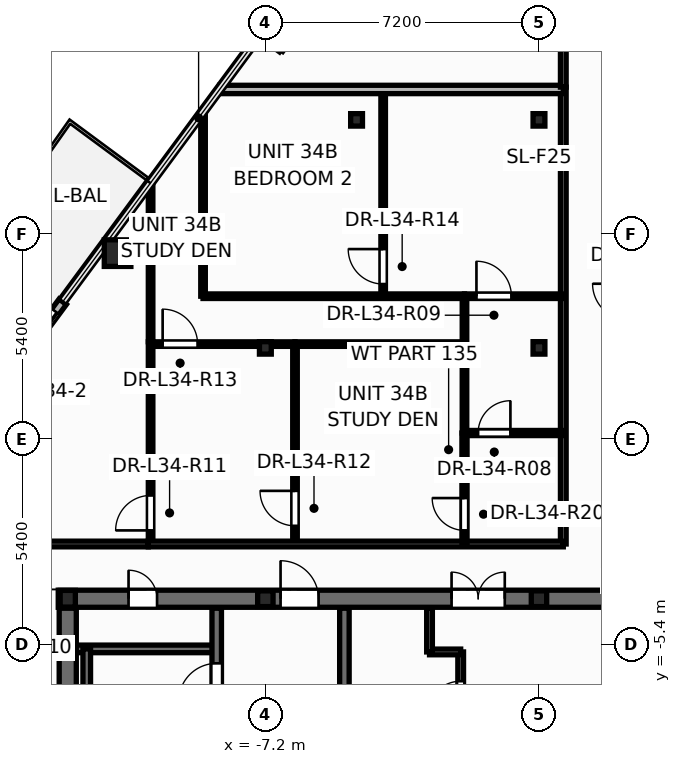
"""IFC4 building model, lengths in metres.
Left out: names, types, materials, properties, quantities, classifications, styles, units other than length and angle.
Written with IfcOpenShell. Run it as: python <this file> out.ifc"""

import sys

from ifc_helpers import new_model, si_unit, direction, frame, frame_2d, origin, origin_2d, place, context, subcontext, project, spatial, rectangle, hollow_circle, i_section, extrude, element, fill, save


model = new_model("IFC4")
c1 = context("Model", 3, precision=1e-05, world=origin(), true_north=direction((0.0, 1.0)))
c2 = subcontext(c1, "Body", "Model", "MODEL_VIEW")
j1 = project(units=[si_unit("LENGTHUNIT", "METRE"), si_unit("PLANEANGLEUNIT", "RADIAN")], contexts=[c1])
p1 = place(None, origin())
s1 = spatial("IfcSite", under=j1, at=p1, CompositionType="ELEMENT")
p2 = place(p1, origin())
s2 = spatial("IfcBuilding", under=s1, at=p2, CompositionType="ELEMENT")
p3 = place(p2, frame((0.0, 0.0, 132.9)))
s3 = spatial("IfcBuildingStorey", under=s2, at=p3, CompositionType="ELEMENT", Elevation=132.9)
p4 = place(p3, frame((-11.089, 4.894, 0.0), z_axis=(0.0, 0.0, 1.0), x_axis=(1.0, 0.0, 0.0)))
e1 = element("IfcColumn", 1, at=p4, inside=s3, PredefinedType="COLUMN", context=c2, shape_type="SweptSolid", body=[
    extrude(hollow_circle(Radius=0.35, WallThickness=0.03, at=origin_2d()), origin(), (0.0, 0.0, 1.0), 3.6),
])
p5 = place(p3, frame((-12.4, -4.2, 0.0), z_axis=(0.0, 0.0, 1.0), x_axis=(1.0, 0.0, 0.0)))
e2 = element("IfcColumn", 2, at=p5, inside=s3, PredefinedType="COLUMN", context=c2, shape_type="SweptSolid", body=[
    extrude(i_section(OverallWidth=0.4, OverallDepth=0.44, WebThickness=0.028, FlangeThickness=0.04, at=origin_2d()), origin(), (0.0, 0.0, 1.0), 3.6),
])
for number, where, z_axis, x_axis in (
    (3, (-7.2, -4.2, 0.0), (0.0, 0.0, 1.0), (1.0, 0.0, 0.0)),
    (4, (0.0, -4.2, 0.0), (0.0, 0.0, 1.0), (1.0, 0.0, 0.0)),
):
    element("IfcColumn", number, at=place(p3, frame(where, z_axis=z_axis, x_axis=x_axis)), inside=s3, PredefinedType="PILASTER", context=c2, shape_type="SweptSolid", body=[
        extrude(i_section(OverallWidth=0.405, OverallDepth=0.414, WebThickness=0.022, FlangeThickness=0.032, at=origin_2d()), origin(), (0.0, 0.0, 1.0), 3.6),
    ])
for number, where, z_axis, x_axis in (
    (5, (-7.2, 2.4, 0.0), (0.0, 0.0, 1.0), (1.0, 0.0, 0.0)),
    (6, (0.0, 2.4, 0.0), (0.0, 0.0, 1.0), (1.0, 0.0, 0.0)),
    (7, (-4.8, 8.4, 0.0), (0.0, 0.0, 1.0), (1.0, 0.0, 0.0)),
    (8, (0.0, 8.4, 0.0), (0.0, 0.0, 1.0), (1.0, 0.0, 0.0)),
):
    element("IfcColumn", number, at=place(p3, frame(where, z_axis=z_axis, x_axis=x_axis)), inside=s3, PredefinedType="COLUMN", context=c2, shape_type="SweptSolid", body=[
        extrude(i_section(OverallWidth=0.311, OverallDepth=0.327, WebThickness=0.016, FlangeThickness=0.025, at=origin_2d()), origin(), (0.0, 0.0, 1.0), 3.6),
    ])
p6 = place(p3, frame((-12.532, 3.614, -0.015), z_axis=(0.0, 0.0, 1.0), x_axis=(-0.594381437757, -0.804183254271, 0.0)))
e9 = element("IfcWall", 9, at=p6, inside=s3, PredefinedType="STANDARD", context=c2, shape_type="SweptSolid", body=[
    extrude(rectangle(XDim=2.14, YDim=0.24, at=frame_2d((1.07, 0.0))), origin(), (0.0, 0.0, 1.0), 2.807),
])
p7 = place(p6, frame((0.32, 0.0, 0.015)))
e10 = element("IfcOpeningElement", 10, at=p7, cuts=e9, PredefinedType="OPENING", context=c2, shape_type="SweptSolid", body=[
    extrude(rectangle(XDim=1.506, YDim=2.204, at=frame_2d((0.75, 1.102))), frame((0.0, 0.13, 0.0), z_axis=(0.0, -1.0, 0.0), x_axis=(1.0, 0.0, 0.0)), (0.0, 0.0, 1.0), 0.26),
])
p8 = place(p3, frame((-2.06, -7.9, 0.0), z_axis=(0.0, 0.0, 1.0), x_axis=(0.0, 1.0, 0.0)))
e11 = element("IfcWall", 11, at=p8, inside=s3, PredefinedType="PARTITIONING", context=c2, shape_type="SweptSolid", body=[
    extrude(rectangle(XDim=2.3, YDim=0.15, at=frame_2d((1.15, 0.0))), origin(), (0.0, 0.0, 1.0), 3.35),
])
p9 = place(p8, frame((0.65, 0.0, 0.0)))
e12 = element("IfcOpeningElement", 12, at=p9, cuts=e11, PredefinedType="OPENING", context=c2, shape_type="SweptSolid", body=[
    extrude(rectangle(XDim=0.886, YDim=2.104, at=frame_2d((0.44, 1.052))), frame((0.0, 0.085, 0.0), z_axis=(0.0, -1.0, 0.0), x_axis=(1.0, 0.0, 0.0)), (0.0, 0.0, 1.0), 0.17),
])
p10 = place(p3, frame((-2.88, -5.6, 0.0), z_axis=(0.0, 0.0, 1.0), x_axis=(1.0, 0.0, 0.0)))
e13 = element("IfcWall", 13, at=p10, inside=s3, PredefinedType="PARTITIONING", context=c2, shape_type="SweptSolid", body=[
    extrude(rectangle(XDim=0.82, YDim=0.15, at=frame_2d((0.41, 0.0))), origin(), (0.0, 0.0, 1.0), 3.35),
])
p11 = place(p3, frame((-2.88, -5.6, 0.0), z_axis=(0.0, 0.0, 1.0), x_axis=(0.0, 1.0, 0.0)))
e14 = element("IfcWall", 14, at=p11, inside=s3, PredefinedType="PARTITIONING", context=c2, shape_type="SweptSolid", body=[
    extrude(rectangle(XDim=1.15, YDim=0.15, at=frame_2d((0.575, 0.0))), origin(), (0.0, 0.0, 1.0), 3.35),
])
p12 = place(p3, frame((-12.65, -4.2, 0.0), z_axis=(0.0, 0.0, 1.0), x_axis=(1.0, 0.0, 0.0)))
e15 = element("IfcWall", 15, at=p12, inside=s3, PredefinedType="SHEAR", context=c2, shape_type="SweptSolid", body=[
    extrude(rectangle(XDim=25.3, YDim=0.45, at=frame_2d((12.65, 0.0))), origin(), (0.0, 0.0, 1.0), 3.6),
])
p13 = place(p12, frame((1.85, 0.0, 0.0)))
e16 = element("IfcOpeningElement", 16, at=p13, cuts=e15, PredefinedType="OPENING", context=c2, shape_type="SweptSolid", body=[
    extrude(rectangle(XDim=0.756, YDim=2.054, at=frame_2d((0.375, 1.027))), frame((0.0, 0.235, 0.0), z_axis=(0.0, -1.0, 0.0), x_axis=(1.0, 0.0, 0.0)), (0.0, 0.0, 1.0), 0.47),
])
p14 = place(p12, frame((21.85, 0.0, 0.0)))
e17 = element("IfcOpeningElement", 17, at=p14, cuts=e15, PredefinedType="OPENING", context=c2, shape_type="SweptSolid", body=[
    extrude(rectangle(XDim=0.756, YDim=2.054, at=frame_2d((0.375, 1.027))), frame((0.0, 0.235, 0.0), z_axis=(0.0, -1.0, 0.0), x_axis=(1.0, 0.0, 0.0)), (0.0, 0.0, 1.0), 0.47),
])
p15 = place(p12, frame((23.5, 0.0, 0.0)))
e18 = element("IfcOpeningElement", 18, at=p15, cuts=e15, PredefinedType="OPENING", context=c2, shape_type="SweptSolid", body=[
    extrude(rectangle(XDim=0.756, YDim=2.054, at=frame_2d((0.375, 1.027))), frame((0.0, 0.235, 0.0), z_axis=(0.0, -1.0, 0.0), x_axis=(1.0, 0.0, 0.0)), (0.0, 0.0, 1.0), 0.47),
])
p16 = place(p12, frame((5.85, 0.0, 0.0)))
e19 = element("IfcOpeningElement", 19, at=p16, cuts=e15, PredefinedType="OPENING", context=c2, shape_type="SweptSolid", body=[
    extrude(rectangle(XDim=1.006, YDim=2.104, at=frame_2d((0.5, 1.052))), frame((0.0, 0.235, 0.0), z_axis=(0.0, -1.0, 0.0), x_axis=(1.0, 0.0, 0.0)), (0.0, 0.0, 1.0), 0.47),
])
p17 = place(p12, frame((10.35, 0.0, 0.0)))
e20 = element("IfcOpeningElement", 20, at=p17, cuts=e15, PredefinedType="OPENING", context=c2, shape_type="SweptSolid", body=[
    extrude(rectangle(XDim=1.406, YDim=2.154, at=frame_2d((0.7, 1.077))), frame((0.0, 0.235, 0.0), z_axis=(0.0, -1.0, 0.0), x_axis=(1.0, 0.0, 0.0)), (0.0, 0.0, 1.0), 0.47),
])
p18 = place(p12, frame((18.45, 0.0, 0.0)))
e21 = element("IfcOpeningElement", 21, at=p18, cuts=e15, PredefinedType="OPENING", context=c2, shape_type="SweptSolid", body=[
    extrude(rectangle(XDim=1.006, YDim=2.104, at=frame_2d((0.5, 1.052))), frame((0.0, 0.235, 0.0), z_axis=(0.0, -1.0, 0.0), x_axis=(1.0, 0.0, 0.0)), (0.0, 0.0, 1.0), 0.47),
])
p19 = place(p3, frame((-12.35, -5.52, 0.0), z_axis=(0.0, 0.0, 1.0), x_axis=(1.0, 0.0, 0.0)))
e22 = element("IfcWall", 22, at=p19, inside=s3, PredefinedType="SOLIDWALL", context=c2, shape_type="SweptSolid", body=[
    extrude(rectangle(XDim=3.87, YDim=0.2, at=frame_2d((1.935, 0.0))), origin(), (0.0, 0.0, 1.0), 3.6),
])
p20 = place(p3, frame((-11.9, -13.1, 0.0), z_axis=(0.0, 0.0, 1.0), x_axis=(0.0, 1.0, 0.0)))
e23 = element("IfcWall", 23, at=p20, inside=s3, PredefinedType="SOLIDWALL", context=c2, shape_type="SweptSolid", body=[
    extrude(rectangle(XDim=7.58, YDim=0.2, at=frame_2d((3.79, 0.0))), origin(), (0.0, 0.0, 1.0), 3.6),
])
p21 = place(p3, frame((-8.48, -13.85, 0.0), z_axis=(0.0, 0.0, 1.0), x_axis=(0.0, 1.0, 0.0)))
e24 = element("IfcWall", 24, at=p21, inside=s3, PredefinedType="SHEAR", context=c2, shape_type="SweptSolid", body=[
    extrude(rectangle(XDim=9.4, YDim=0.25, at=frame_2d((4.7, 0.0))), origin(), (0.0, 0.0, 1.0), 3.6),
])
p22 = place(p21, frame((6.95, 0.0, 0.0)))
e25 = element("IfcOpeningElement", 25, at=p22, cuts=e24, PredefinedType="OPENING", context=c2, shape_type="SweptSolid", body=[
    extrude(rectangle(XDim=1.006, YDim=2.104, at=frame_2d((0.5, 1.052))), frame((0.0, 0.135, 0.0), z_axis=(0.0, -1.0, 0.0), x_axis=(1.0, 0.0, 0.0)), (0.0, 0.0, 1.0), 0.27),
])
p23 = place(p3, frame((-5.12, -13.85, 0.0), z_axis=(0.0, 0.0, 1.0), x_axis=(0.0, 1.0, 0.0)))
e26 = element("IfcWall", 26, at=p23, inside=s3, PredefinedType="SHEAR", context=c2, shape_type="SweptSolid", body=[
    extrude(rectangle(XDim=9.4, YDim=0.25, at=frame_2d((4.7, 0.0))), origin(), (0.0, 0.0, 1.0), 3.6),
])
p24 = place(p3, frame((-12.4, -13.85, 0.0), z_axis=(0.0, 0.0, 1.0), x_axis=(0.0, 1.0, 0.0)))
e27 = element("IfcWall", 27, at=p24, inside=s3, PredefinedType="SHEAR", context=c2, shape_type="SweptSolid", body=[
    extrude(rectangle(XDim=9.4, YDim=0.45, at=frame_2d((4.7, 0.0))), origin(), (0.0, 0.0, 1.0), 3.6),
])
p25 = place(p3, frame((0.64, -2.76, 0.0), z_axis=(0.0, 0.0, 1.0), x_axis=(0.0, 1.0, 0.0)))
e28 = element("IfcWall", 28, at=p25, inside=s3, PredefinedType="PARTITIONING", context=c2, shape_type="SweptSolid", body=[
    extrude(rectangle(XDim=12.02, YDim=0.15, at=frame_2d((6.01, 0.0))), origin(), (0.0, 0.0, 1.0), 2.325),
])
p26 = place(p3, frame((-4.1, 3.76, 0.0), z_axis=(0.0, 0.0, 1.0), x_axis=(0.0, 1.0, 0.0)))
e29 = element("IfcWall", 29, at=p26, inside=s3, PredefinedType="PARTITIONING", context=c2, shape_type="SweptSolid", body=[
    extrude(rectangle(XDim=5.44, YDim=0.12, at=frame_2d((2.72, 0.0))), origin(), (0.0, 0.0, 1.0), 2.617),
])
p27 = place(p26, frame((0.32, 0.0, 0.0)))
e30 = element("IfcOpeningElement", 30, at=p27, cuts=e29, PredefinedType="OPENING", context=c2, shape_type="SweptSolid", body=[
    extrude(rectangle(XDim=0.926, YDim=2.104, at=frame_2d((0.46, 1.052))), frame((0.0, 0.07, 0.0), z_axis=(0.0, -1.0, 0.0), x_axis=(1.0, 0.0, 0.0)), (0.0, 0.0, 1.0), 0.14),
])
p28 = place(p3, frame((-10.22, -2.76, 0.0), z_axis=(0.0, 0.0, 1.0), x_axis=(0.0, 1.0, 0.0)))
e31 = element("IfcWall", 31, at=p28, inside=s3, PredefinedType="PARTITIONING", context=c2, shape_type="SweptSolid", body=[
    extrude(rectangle(XDim=5.32, YDim=0.12, at=frame_2d((2.66, 0.0))), origin(), (0.0, 0.0, 1.0), 2.617),
])
p29 = place(p28, frame((0.358, 0.0, 0.0)))
e32 = element("IfcOpeningElement", 32, at=p29, cuts=e31, PredefinedType="OPENING", context=c2, shape_type="SweptSolid", body=[
    extrude(rectangle(XDim=0.926, YDim=2.104, at=frame_2d((0.46, 1.052))), frame((0.0, 0.07, 0.0), z_axis=(0.0, -1.0, 0.0), x_axis=(1.0, 0.0, 0.0)), (0.0, 0.0, 1.0), 0.14),
])
p30 = place(p3, frame((-6.42, -2.76, 0.0), z_axis=(0.0, 0.0, 1.0), x_axis=(0.0, 1.0, 0.0)))
e33 = element("IfcWall", 33, at=p30, inside=s3, PredefinedType="PARTITIONING", context=c2, shape_type="SweptSolid", body=[
    extrude(rectangle(XDim=5.26, YDim=0.12, at=frame_2d((2.63, 0.0))), origin(), (0.0, 0.0, 1.0), 2.325),
])
p31 = place(p30, frame((0.478, 0.0, 0.0)))
e34 = element("IfcOpeningElement", 34, at=p31, cuts=e33, PredefinedType="OPENING", context=c2, shape_type="SweptSolid", body=[
    extrude(rectangle(XDim=0.926, YDim=2.104, at=frame_2d((0.46, 1.052))), frame((0.0, 0.07, 0.0), z_axis=(0.0, -1.0, 0.0), x_axis=(1.0, 0.0, 0.0)), (0.0, 0.0, 1.0), 0.14),
])
p32 = place(p3, frame((-8.84, 3.76, 0.0), z_axis=(0.0, 0.0, 1.0), x_axis=(0.0, 1.0, 0.0)))
e35 = element("IfcWall", 35, at=p32, inside=s3, PredefinedType="PARTITIONING", context=c2, shape_type="SweptSolid", body=[
    extrude(rectangle(XDim=4.849, YDim=0.12, at=frame_2d((2.425, 0.0))), origin(), (0.0, 0.0, 1.0), 2.617),
])
p33 = place(p3, frame((-8.84, 3.76, 0.0), z_axis=(0.0, 0.0, 1.0), x_axis=(1.0, 0.0, 0.0)))
e36 = element("IfcWall", 36, at=p33, inside=s3, PredefinedType="PARTITIONING", context=c2, shape_type="SweptSolid", body=[
    extrude(rectangle(XDim=6.88, YDim=0.12, at=frame_2d((3.44, 0.0))), origin(), (0.0, 0.0, 1.0), 2.617),
])
p34 = place(p3, frame((-8.404, 9.2, 0.0), z_axis=(0.0, 0.0, 1.0), x_axis=(1.0, 0.0, 0.0)))
e37 = element("IfcWall", 37, at=p34, inside=s3, PredefinedType="PARTITIONING", context=c2, shape_type="SweptSolid", body=[
    extrude(rectangle(XDim=9.043, YDim=0.22, at=frame_2d((4.522, 0.0))), origin(), (0.0, 0.0, 1.0), 2.617),
])
p35 = place(p3, frame((-10.28, -2.76, 0.0), z_axis=(0.0, 0.0, 1.0), x_axis=(1.0, 0.0, 0.0)))
e38 = element("IfcWall", 38, at=p35, inside=s3, PredefinedType="PARTITIONING", context=c2, shape_type="SweptSolid", body=[
    extrude(rectangle(XDim=10.92, YDim=0.15, at=frame_2d((5.46, 0.0))), origin(), (0.0, 0.0, 1.0), 2.325),
])
p36 = place(p3, frame((-14.64, -2.76, 0.0), z_axis=(0.0, 0.0, 1.0), x_axis=(1.0, 0.0, 0.0)))
e39 = element("IfcWall", 39, at=p36, inside=s3, PredefinedType="PARTITIONING", context=c2, shape_type="SweptSolid", body=[
    extrude(rectangle(XDim=4.358, YDim=0.15, at=frame_2d((2.179, 0.0))), origin(), (0.0, 0.0, 1.0), 3.35),
])
p37 = place(p36, frame((0.358, 0.0, 0.0)))
e40 = element("IfcOpeningElement", 40, at=p37, cuts=e39, PredefinedType="OPENING", context=c2, shape_type="SweptSolid", body=[
    extrude(rectangle(XDim=0.956, YDim=2.104, at=frame_2d((0.475, 1.052))), frame((0.0, 0.085, 0.0), z_axis=(0.0, -1.0, 0.0), x_axis=(1.0, 0.0, 0.0)), (0.0, 0.0, 1.0), 0.17),
])
p38 = place(p3, frame((-6.42, 2.5, 0.0), z_axis=(0.0, 0.0, 1.0), x_axis=(1.0, 0.0, 0.0)))
e41 = element("IfcWall", 41, at=p38, inside=s3, PredefinedType="PARTITIONING", context=c2, shape_type="SweptSolid", body=[
    extrude(rectangle(XDim=4.46, YDim=0.12, at=frame_2d((2.23, 0.0))), origin(), (0.0, 0.0, 1.0), 2.325),
])
p39 = place(p3, frame((-10.22, 2.562, 0.0), z_axis=(0.0, 0.0, 1.0), x_axis=(0.0, 1.0, 0.0)))
e42 = element("IfcWall", 42, at=p39, inside=s3, PredefinedType="PARTITIONING", context=c2, shape_type="SweptSolid", body=[
    extrude(rectangle(XDim=4.18, YDim=0.12, at=frame_2d((2.09, 0.0))), origin(), (0.0, 0.0, 1.0), 2.617),
])
p40 = place(p3, frame((0.64, 9.262, 0.0), z_axis=(0.0, 0.0, 1.0), x_axis=(0.0, 1.0, 0.0)))
e43 = element("IfcWall", 43, at=p40, inside=s3, PredefinedType="PARTITIONING", context=c2, shape_type="SweptSolid", body=[
    extrude(rectangle(XDim=4.052, YDim=0.15, at=frame_2d((2.026, 0.0))), origin(), (0.0, 0.0, 1.0), 2.792),
])
p41 = place(p40, frame((1.031, 0.0, 0.0)))
e44 = element("IfcOpeningElement", 44, at=p41, cuts=e43, PredefinedType="OPENING", context=c2, shape_type="SweptSolid", body=[
    extrude(rectangle(XDim=0.956, YDim=2.104, at=frame_2d((0.475, 1.052))), frame((0.0, 0.085, 0.0), z_axis=(0.0, -1.0, 0.0), x_axis=(1.0, 0.0, 0.0)), (0.0, 0.0, 1.0), 0.17),
])
p42 = place(p3, frame((-10.22, 2.5, 0.0), z_axis=(0.0, 0.0, 1.0), x_axis=(1.0, 0.0, 0.0)))
e45 = element("IfcWall", 45, at=p42, inside=s3, PredefinedType="PARTITIONING", context=c2, shape_type="SweptSolid", body=[
    extrude(rectangle(XDim=3.8, YDim=0.12, at=frame_2d((1.9, 0.0))), origin(), (0.0, 0.0, 1.0), 2.325),
])
p43 = place(p42, frame((0.317, 0.0, 0.0)))
e46 = element("IfcOpeningElement", 46, at=p43, cuts=e45, PredefinedType="OPENING", context=c2, shape_type="SweptSolid", body=[
    extrude(rectangle(XDim=0.926, YDim=2.104, at=frame_2d((0.46, 1.052))), frame((0.0, 0.07, 0.0), z_axis=(0.0, -1.0, 0.0), x_axis=(1.0, 0.0, 0.0)), (0.0, 0.0, 1.0), 0.14),
])
p44 = place(p3, frame((-1.96, -2.76, 0.0), z_axis=(0.0, 0.0, 1.0), x_axis=(0.0, 1.0, 0.0)))
e47 = element("IfcWall", 47, at=p44, inside=s3, PredefinedType="PARTITIONING", context=c2, shape_type="SweptSolid", body=[
    extrude(rectangle(XDim=2.92, YDim=0.135, at=frame_2d((1.46, 0.0))), origin(), (0.0, 0.0, 1.0), 3.35),
])
p45 = place(p44, frame((0.359, 0.0, 0.0)))
e48 = element("IfcOpeningElement", 48, at=p45, cuts=e47, PredefinedType="OPENING", context=c2, shape_type="SweptSolid", body=[
    extrude(rectangle(XDim=0.856, YDim=2.104, at=frame_2d((0.425, 1.052))), frame((0.0, 0.078, 0.0), z_axis=(0.0, -1.0, 0.0), x_axis=(1.0, 0.0, 0.0)), (0.0, 0.0, 1.0), 0.155),
])
p46 = place(p3, frame((-1.96, 0.16, 0.0), z_axis=(0.0, 0.0, 1.0), x_axis=(1.0, 0.0, 0.0)))
e49 = element("IfcWall", 49, at=p46, inside=s3, PredefinedType="PARTITIONING", context=c2, shape_type="SweptSolid", body=[
    extrude(rectangle(XDim=2.6, YDim=0.135, at=frame_2d((1.3, 0.0))), origin(), (0.0, 0.0, 1.0), 2.325),
])
p47 = place(p46, frame((0.358, 0.0, 0.0)))
e50 = element("IfcOpeningElement", 50, at=p47, cuts=e49, PredefinedType="OPENING", context=c2, shape_type="SweptSolid", body=[
    extrude(rectangle(XDim=0.856, YDim=2.104, at=frame_2d((0.425, 1.052))), frame((0.0, 0.078, 0.0), z_axis=(0.0, -1.0, 0.0), x_axis=(1.0, 0.0, 0.0)), (0.0, 0.0, 1.0), 0.155),
])
p48 = place(p3, frame((-1.96, 3.76, 0.0), z_axis=(0.0, 0.0, 1.0), x_axis=(1.0, 0.0, 0.0)))
e51 = element("IfcWall", 51, at=p48, inside=s3, PredefinedType="PARTITIONING", context=c2, shape_type="SweptSolid", body=[
    extrude(rectangle(XDim=2.6, YDim=0.12, at=frame_2d((1.3, 0.0))), origin(), (0.0, 0.0, 1.0), 2.325),
])
p49 = place(p48, frame((0.315, 0.0, 0.0)))
e52 = element("IfcOpeningElement", 52, at=p49, cuts=e51, PredefinedType="OPENING", context=c2, shape_type="SweptSolid", body=[
    extrude(rectangle(XDim=0.926, YDim=2.104, at=frame_2d((0.46, 1.052))), frame((0.0, 0.07, 0.0), z_axis=(0.0, -1.0, 0.0), x_axis=(1.0, 0.0, 0.0)), (0.0, 0.0, 1.0), 0.14),
])
p50 = place(p3, frame((-1.96, 0.16, 0.0), z_axis=(0.0, 0.0, 1.0), x_axis=(0.0, 1.0, 0.0)))
e53 = element("IfcWall", 53, at=p50, inside=s3, PredefinedType="PARTITIONING", context=c2, shape_type="SweptSolid", body=[
    extrude(rectangle(XDim=3.6, YDim=0.12, at=frame_2d((1.8, 0.0))), origin(), (0.0, 0.0, 1.0), 2.325),
])
p51 = place(p7, origin())
e54 = element("IfcDoor", 54, at=p51, inside=s3, OperationType="SLIDING_TO_RIGHT", PredefinedType="DOOR", context=c2, shape_type="SweptSolid", body=[
    extrude(rectangle(XDim=1.5, YDim=2.2, at=frame_2d((0.75, 1.1))), frame((0.0, 0.025, 0.0), z_axis=(0.0, -1.0, 0.0), x_axis=(1.0, 0.0, 0.0)), (0.0, 0.0, 1.0), 0.05),
])
fill(e10, e54)
p52 = place(p9, origin())
e55 = element("IfcDoor", 55, at=p52, inside=s3, OperationType="SINGLE_SWING_LEFT", PredefinedType="DOOR", context=c2, shape_type="SweptSolid", body=[
    extrude(rectangle(XDim=0.88, YDim=2.1, at=frame_2d((0.44, 1.05))), frame((0.0, 0.025, 0.0), z_axis=(0.0, -1.0, 0.0), x_axis=(1.0, 0.0, 0.0)), (0.0, 0.0, 1.0), 0.05),
])
fill(e12, e55)
p53 = place(p22, origin())
e56 = element("IfcDoor", 56, at=p53, inside=s3, OperationType="SINGLE_SWING_LEFT", PredefinedType="DOOR", context=c2, shape_type="SweptSolid", body=[
    extrude(rectangle(XDim=1.0, YDim=2.1, at=frame_2d((0.5, 1.05))), frame((0.0, 0.025, 0.0), z_axis=(0.0, -1.0, 0.0), x_axis=(1.0, 0.0, 0.0)), (0.0, 0.0, 1.0), 0.05),
])
fill(e25, e56)
p54 = place(p13, origin())
e57 = element("IfcDoor", 57, at=p54, inside=s3, OperationType="SINGLE_SWING_LEFT", PredefinedType="DOOR", context=c2, shape_type="SweptSolid", body=[
    extrude(rectangle(XDim=0.75, YDim=2.05, at=frame_2d((0.375, 1.025))), frame((0.0, 0.025, 0.0), z_axis=(0.0, -1.0, 0.0), x_axis=(1.0, 0.0, 0.0)), (0.0, 0.0, 1.0), 0.05),
])
fill(e16, e57)
p55 = place(p16, origin())
e58 = element("IfcDoor", 58, at=p55, inside=s3, OperationType="SINGLE_SWING_LEFT", PredefinedType="DOOR", context=c2, shape_type="SweptSolid", body=[
    extrude(rectangle(XDim=1.0, YDim=2.1, at=frame_2d((0.5, 1.05))), frame((0.0, 0.025, 0.0), z_axis=(0.0, -1.0, 0.0), x_axis=(1.0, 0.0, 0.0)), (0.0, 0.0, 1.0), 0.05),
])
fill(e19, e58)
p56 = place(p17, origin())
e59 = element("IfcDoor", 59, at=p56, inside=s3, OperationType="DOUBLE_DOOR_SINGLE_SWING", PredefinedType="DOOR", context=c2, shape_type="SweptSolid", body=[
    extrude(rectangle(XDim=1.4, YDim=2.15, at=frame_2d((0.7, 1.075))), frame((0.0, 0.025, 0.0), z_axis=(0.0, -1.0, 0.0), x_axis=(1.0, 0.0, 0.0)), (0.0, 0.0, 1.0), 0.05),
])
fill(e20, e59)
p57 = place(p47, origin())
e60 = element("IfcDoor", 60, at=p57, inside=s3, OperationType="SINGLE_SWING_RIGHT", PredefinedType="DOOR", context=c2, shape_type="SweptSolid", body=[
    extrude(rectangle(XDim=0.85, YDim=2.1, at=frame_2d((0.425, 1.05))), frame((0.0, 0.025, 0.0), z_axis=(0.0, -1.0, 0.0), x_axis=(1.0, 0.0, 0.0)), (0.0, 0.0, 1.0), 0.05),
])
fill(e50, e60)
p58 = place(p49, origin())
e61 = element("IfcDoor", 61, at=p58, inside=s3, OperationType="SINGLE_SWING_LEFT", PredefinedType="DOOR", context=c2, shape_type="SweptSolid", body=[
    extrude(rectangle(XDim=0.92, YDim=2.1, at=frame_2d((0.46, 1.05))), frame((0.0, 0.025, 0.0), z_axis=(0.0, -1.0, 0.0), x_axis=(1.0, 0.0, 0.0)), (0.0, 0.0, 1.0), 0.05),
])
fill(e52, e61)
p59 = place(p29, origin())
e62 = element("IfcDoor", 62, at=p59, inside=s3, OperationType="SINGLE_SWING_LEFT", PredefinedType="DOOR", context=c2, shape_type="SweptSolid", body=[
    extrude(rectangle(XDim=0.92, YDim=2.1, at=frame_2d((0.46, 1.05))), frame((0.0, 0.025, 0.0), z_axis=(0.0, -1.0, 0.0), x_axis=(1.0, 0.0, 0.0)), (0.0, 0.0, 1.0), 0.05),
])
fill(e32, e62)
p60 = place(p31, origin())
e63 = element("IfcDoor", 63, at=p60, inside=s3, OperationType="SINGLE_SWING_RIGHT", PredefinedType="DOOR", context=c2, shape_type="SweptSolid", body=[
    extrude(rectangle(XDim=0.92, YDim=2.1, at=frame_2d((0.46, 1.05))), frame((0.0, 0.025, 0.0), z_axis=(0.0, -1.0, 0.0), x_axis=(1.0, 0.0, 0.0)), (0.0, 0.0, 1.0), 0.05),
])
fill(e34, e63)
p61 = place(p43, origin())
e64 = element("IfcDoor", 64, at=p61, inside=s3, OperationType="SINGLE_SWING_LEFT", PredefinedType="DOOR", context=c2, shape_type="SweptSolid", body=[
    extrude(rectangle(XDim=0.92, YDim=2.1, at=frame_2d((0.46, 1.05))), frame((0.0, 0.025, 0.0), z_axis=(0.0, -1.0, 0.0), x_axis=(1.0, 0.0, 0.0)), (0.0, 0.0, 1.0), 0.05),
])
fill(e46, e64)
p62 = place(p27, origin())
e65 = element("IfcDoor", 65, at=p62, inside=s3, OperationType="SINGLE_SWING_RIGHT", PredefinedType="DOOR", context=c2, shape_type="SweptSolid", body=[
    extrude(rectangle(XDim=0.92, YDim=2.1, at=frame_2d((0.46, 1.05))), frame((0.0, 0.025, 0.0), z_axis=(0.0, -1.0, 0.0), x_axis=(1.0, 0.0, 0.0)), (0.0, 0.0, 1.0), 0.05),
])
fill(e30, e65)
p63 = place(p45, origin())
e66 = element("IfcDoor", 66, at=p63, inside=s3, OperationType="SINGLE_SWING_RIGHT", PredefinedType="DOOR", context=c2, shape_type="SweptSolid", body=[
    extrude(rectangle(XDim=0.85, YDim=2.1, at=frame_2d((0.425, 1.05))), frame((0.0, 0.025, 0.0), z_axis=(0.0, -1.0, 0.0), x_axis=(1.0, 0.0, 0.0)), (0.0, 0.0, 1.0), 0.05),
])
fill(e48, e66)
save(model, sys.argv[1])
